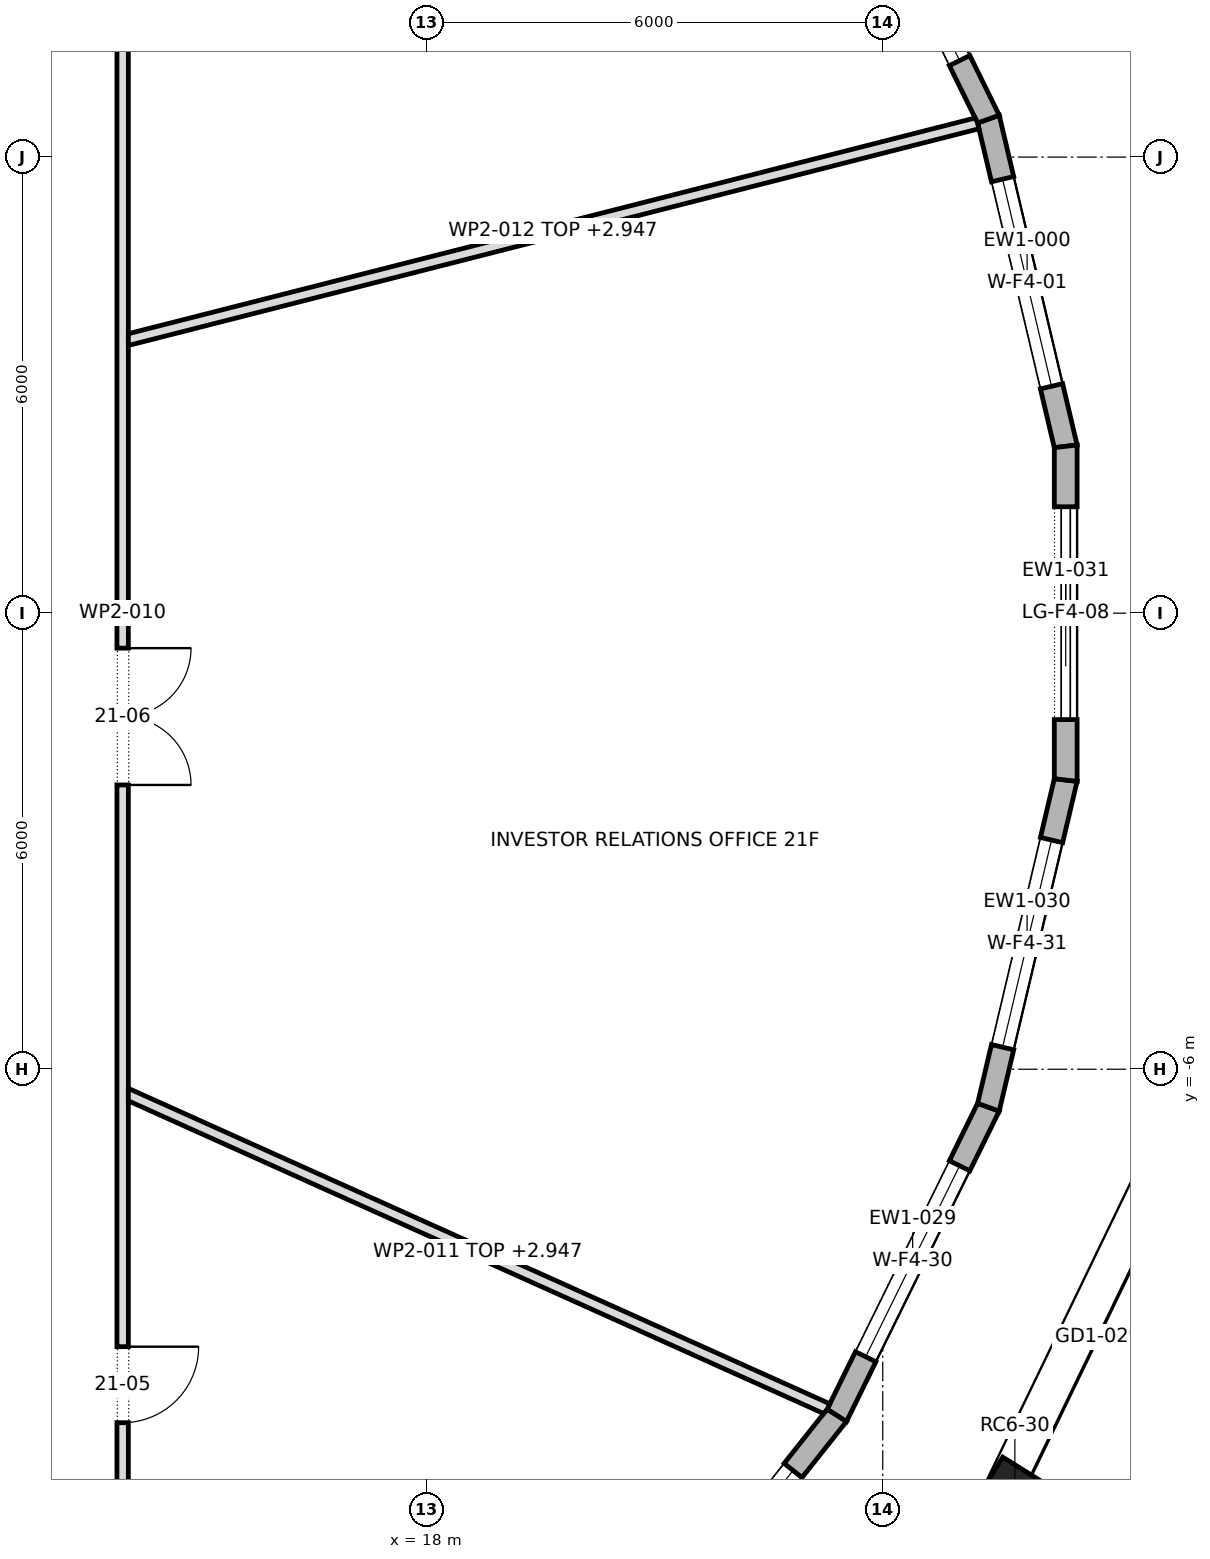
"""IFC4 building model, lengths in metres.
Left out: names, types, materials, properties, quantities, classifications, styles, units other than length and angle.
Written with IfcOpenShell. Run it as: python <this file> out.ifc"""

import sys

from ifc_helpers import new_model, si_unit, direction, frame, frame_2d, origin, origin_2d, place, context, subcontext, project, spatial, polyline, rectangle, outline, extrude, element, fill, save


model = new_model("IFC4")
c1 = context("Model", 3, precision=1e-05, world=origin(), true_north=direction((0.0, 1.0)))
c2 = subcontext(c1, "Body", "Model", "MODEL_VIEW")
j1 = project(units=[si_unit("LENGTHUNIT", "METRE"), si_unit("PLANEANGLEUNIT", "RADIAN")], contexts=[c1])
p1 = place(None, origin())
s1 = spatial("IfcSite", under=j1, at=p1, CompositionType="ELEMENT")
p2 = place(p1, origin())
s2 = spatial("IfcBuilding", under=s1, at=p2, CompositionType="ELEMENT")
p3 = place(p2, frame((0.0, 0.0, 292.3)))
s3 = spatial("IfcBuildingStorey", under=s2, at=p3, CompositionType="ELEMENT", Elevation=292.3)
p4 = place(p3, frame((25.738, -11.792, 0.0), z_axis=(0.0, 0.0, 1.0), x_axis=(0.529141977228, 0.848533303964, 0.0)))
e1 = element("IfcColumn", 1, at=p4, inside=s3, PredefinedType="COLUMN", context=c2, shape_type="SweptSolid", body=[
    extrude(rectangle(XDim=1.0, YDim=1.0, at=origin_2d()), origin(), (0.0, 0.0, 1.0), 4.0),
])
p5 = place(p3, frame((26.407, 2.195, 0.0), z_axis=(0.0, 0.0, 1.0), x_axis=(-0.229943714271, 0.973203929435, 0.0)))
e2 = element("IfcWall", 2, at=p5, inside=s3, PredefinedType="STANDARD", context=c2, shape_type="SweptSolid", body=[
    extrude(outline(polyline([(-0.018, -0.15), (4.44, -0.15), (4.406, 0.15), (0.018, 0.15), (-0.018, -0.15)])), origin(), (0.0, 0.0, 1.0), 3.7),
])
p6 = place(p5, frame((0.812, 0.0, 0.6)))
e3 = element("IfcOpeningElement", 3, at=p6, cuts=e2, PredefinedType="OPENING", context=c2, shape_type="SweptSolid", body=[
    extrude(rectangle(XDim=2.8, YDim=2.65, at=frame_2d((1.4, 1.325))), frame((0.0, 0.162, 0.0), z_axis=(0.0, -1.0, 0.0), x_axis=(1.0, 0.0, 0.0)), (0.0, 0.0, 1.0), 0.324),
])
p7 = place(p3, frame((25.39, 6.5, 0.0), z_axis=(0.0, 0.0, 1.0), x_axis=(-0.441431671743, 0.897294867467, 0.0)))
e4 = element("IfcWall", 4, at=p7, inside=s3, PredefinedType="STANDARD", context=c2, shape_type="SweptSolid", body=[
    extrude(outline(polyline([(-0.017, -0.15), (4.533, -0.15), (4.501, 0.15), (0.017, 0.15), (-0.017, -0.15)])), origin(), (0.0, 0.0, 1.0), 3.7),
])
p8 = place(p7, frame((0.858, 0.0, 0.6)))
e5 = element("IfcOpeningElement", 5, at=p8, cuts=e4, PredefinedType="OPENING", context=c2, shape_type="SweptSolid", body=[
    extrude(rectangle(XDim=2.8, YDim=2.65, at=frame_2d((1.4, 1.325))), frame((0.0, 0.162, 0.0), z_axis=(0.0, -1.0, 0.0), x_axis=(1.0, 0.0, 0.0)), (0.0, 0.0, 1.0), 0.324),
])
p9 = place(p3, frame((20.503, -14.198, 0.0), z_axis=(0.0, 0.0, 1.0), x_axis=(0.621625671247, 0.783314448256, 0.0)))
e6 = element("IfcWall", 6, at=p9, inside=s3, PredefinedType="STANDARD", context=c2, shape_type="SweptSolid", body=[
    extrude(outline(polyline([(-0.015, -0.15), (4.67, -0.15), (4.637, 0.15), (0.015, 0.15), (-0.015, -0.15)])), origin(), (0.0, 0.0, 1.0), 3.7),
])
p10 = place(p9, frame((0.927, 0.0, 0.6)))
e7 = element("IfcOpeningElement", 7, at=p10, cuts=e6, PredefinedType="OPENING", context=c2, shape_type="SweptSolid", body=[
    extrude(rectangle(XDim=2.8, YDim=2.65, at=frame_2d((1.4, 1.325))), frame((0.0, 0.162, 0.0), z_axis=(0.0, -1.0, 0.0), x_axis=(1.0, 0.0, 0.0)), (0.0, 0.0, 1.0), 0.324),
])
p11 = place(p3, frame((23.396, -10.553, 0.0), z_axis=(0.0, 0.0, 1.0), x_axis=(0.441431671743, 0.897294867467, 0.0)))
e8 = element("IfcWall", 8, at=p11, inside=s3, PredefinedType="STANDARD", context=c2, shape_type="SweptSolid", body=[
    extrude(outline(polyline([(-0.016, -0.15), (4.534, -0.15), (4.5, 0.15), (0.016, 0.15), (-0.016, -0.15)])), origin(), (0.0, 0.0, 1.0), 3.7),
])
p12 = place(p11, frame((0.858, 0.0, 0.6)))
e9 = element("IfcOpeningElement", 9, at=p12, cuts=e8, PredefinedType="OPENING", context=c2, shape_type="SweptSolid", body=[
    extrude(rectangle(XDim=2.8, YDim=2.65, at=frame_2d((1.4, 1.325))), frame((0.0, 0.162, 0.0), z_axis=(0.0, -1.0, 0.0), x_axis=(1.0, 0.0, 0.0)), (0.0, 0.0, 1.0), 0.324),
])
p13 = place(p3, frame((25.39, -6.5, 0.0), z_axis=(0.0, 0.0, 1.0), x_axis=(0.229943714271, 0.973203929435, 0.0)))
e10 = element("IfcWall", 10, at=p13, inside=s3, PredefinedType="STANDARD", context=c2, shape_type="SweptSolid", body=[
    extrude(outline(polyline([(-0.017, -0.15), (4.441, -0.15), (4.406, 0.15), (0.017, 0.15), (-0.017, -0.15)])), origin(), (0.0, 0.0, 1.0), 3.7),
])
p14 = place(p13, frame((0.812, 0.0, 0.6)))
e11 = element("IfcOpeningElement", 11, at=p14, cuts=e10, PredefinedType="OPENING", context=c2, shape_type="SweptSolid", body=[
    extrude(rectangle(XDim=2.8, YDim=2.65, at=frame_2d((1.4, 1.325))), frame((0.0, 0.162, 0.0), z_axis=(0.0, -1.0, 0.0), x_axis=(1.0, 0.0, 0.0)), (0.0, 0.0, 1.0), 0.324),
])
p15 = place(p3, frame((26.407, -2.195, 0.0), z_axis=(0.0, 0.0, 1.0), x_axis=(0.0, 1.0, 0.0)))
e12 = element("IfcWall", 12, at=p15, inside=s3, PredefinedType="STANDARD", context=c2, shape_type="SweptSolid", body=[
    extrude(outline(polyline([(-0.018, -0.15), (4.408, -0.15), (4.373, 0.15), (0.018, 0.15), (-0.018, -0.15)])), origin(), (0.0, 0.0, 1.0), 3.7),
])
p16 = place(p15, frame((0.795, 0.0, 0.0)))
e13 = element("IfcOpeningElement", 13, at=p16, cuts=e12, PredefinedType="OPENING", context=c2, shape_type="SweptSolid", body=[
    extrude(rectangle(XDim=2.8, YDim=3.25, at=frame_2d((1.4, 1.625))), frame((0.0, 0.162, 0.0), z_axis=(0.0, -1.0, 0.0), x_axis=(1.0, 0.0, 0.0)), (0.0, 0.0, 1.0), 0.324),
])
p17 = place(p3, frame((14.0, -14.075, 0.0), z_axis=(0.0, 0.0, 1.0), x_axis=(0.0, 1.0, 0.0)))
e14 = element("IfcWall", 14, at=p17, inside=s3, PredefinedType="PARTITIONING", context=c2, shape_type="SweptSolid", body=[
    extrude(outline(polyline([(0.0, -0.075), (1.877, -0.075), (3.753, -0.075), (5.63, -0.075), (7.507, -0.075), (9.383, -0.075), (11.26, -0.075), (13.137, -0.075), (15.013, -0.075), (16.89, -0.075), (18.767, -0.075), (20.643, -0.075), (22.52, -0.075), (24.396, -0.075), (26.273, -0.075), (28.15, -0.075), (28.0, 0.075), (26.011, 0.075), (24.021, 0.075), (22.032, 0.075), (20.043, 0.075), (18.053, 0.075), (16.064, 0.075), (14.075, 0.075), (12.086, 0.075), (10.096, 0.075), (8.107, 0.075), (6.118, 0.075), (4.128, 0.075), (2.139, 0.075), (0.15, 0.075), (0.0, -0.075)])), origin(), (0.0, 0.0, 1.0), 3.7),
])
p18 = place(p17, frame((3.425, 0.0, 0.0)))
e15 = element("IfcOpeningElement", 15, at=p18, cuts=e14, PredefinedType="OPENING", context=c2, shape_type="SweptSolid", body=[
    extrude(rectangle(XDim=1.0, YDim=2.1, at=frame_2d((0.5, 1.05))), frame((0.0, 0.087, 0.0), z_axis=(0.0, -1.0, 0.0), x_axis=(1.0, 0.0, 0.0)), (0.0, 0.0, 1.0), 0.174),
])
p19 = place(p17, frame((11.815, 0.0, 0.0)))
e16 = element("IfcOpeningElement", 16, at=p19, cuts=e14, PredefinedType="OPENING", context=c2, shape_type="SweptSolid", body=[
    extrude(rectangle(XDim=1.8, YDim=2.1, at=frame_2d((0.9, 1.05))), frame((0.0, 0.087, 0.0), z_axis=(0.0, -1.0, 0.0), x_axis=(1.0, 0.0, 0.0)), (0.0, 0.0, 1.0), 0.174),
])
p20 = place(p17, frame((21.965, 0.0, 0.0)))
e17 = element("IfcOpeningElement", 17, at=p20, cuts=e14, PredefinedType="OPENING", context=c2, shape_type="SweptSolid", body=[
    extrude(rectangle(XDim=1.8, YDim=2.1, at=frame_2d((0.9, 1.05))), frame((0.0, 0.087, 0.0), z_axis=(0.0, -1.0, 0.0), x_axis=(1.0, 0.0, 0.0)), (0.0, 0.0, 1.0), 0.174),
])
p21 = place(p3, frame((14.045, -6.32, 0.0), z_axis=(0.0, 0.0, 1.0), x_axis=(0.912030730905, -0.410121867114, 0.0)))
e18 = element("IfcWall", 18, at=p21, inside=s3, PredefinedType="PARTITIONING", context=c2, shape_type="SweptSolid", body=[
    extrude(outline(polyline([(0.067, -0.075), (1.739, -0.075), (3.41, -0.075), (5.082, -0.075), (6.754, -0.075), (8.426, -0.075), (10.097, -0.075), (10.115, -0.004), (10.118, 0.073), (10.118, 0.075), (8.432, 0.075), (6.745, 0.075), (5.059, 0.075), (3.373, 0.075), (1.686, 0.075), (0.0, 0.075), (0.0, 0.074), (0.067, -0.075)])), origin(), (0.0, 0.0, 1.0), 2.947),
])
p22 = place(p3, frame((14.057, 3.594, 0.0), z_axis=(0.0, 0.0, 1.0), x_axis=(0.969049648941, 0.246865910742, 0.0)))
e19 = element("IfcWall", 19, at=p22, inside=s3, PredefinedType="PARTITIONING", context=c2, shape_type="SweptSolid", body=[
    extrude(outline(polyline([(11.548, -0.075), (11.548, 0.011), (11.535, 0.075), (9.618, 0.075), (7.702, 0.075), (5.786, 0.075), (3.87, 0.075), (1.954, 0.075), (0.038, 0.075), (0.0, -0.074), (0.0, -0.075), (1.925, -0.075), (3.849, -0.075), (5.774, -0.075), (7.699, -0.075), (9.624, -0.075), (11.548, -0.075)])), origin(), (0.0, 0.0, 1.0), 2.947),
])
p23 = place(p6, origin())
e20 = element("IfcWindow", 20, at=p23, inside=s3, PartitioningType="DOUBLE_PANEL_VERTICAL", PredefinedType="WINDOW", context=c2, shape_type="SweptSolid", body=[
    extrude(rectangle(XDim=2.8, YDim=2.65, at=frame_2d((1.4, 1.325))), frame((0.0, 0.03, 0.0), z_axis=(0.0, -1.0, 0.0), x_axis=(1.0, 0.0, 0.0)), (0.0, 0.0, 1.0), 0.06),
])
fill(e3, e20)
p24 = place(p8, origin())
e21 = element("IfcWindow", 21, at=p24, inside=s3, PartitioningType="DOUBLE_PANEL_VERTICAL", PredefinedType="WINDOW", context=c2, shape_type="SweptSolid", body=[
    extrude(rectangle(XDim=2.8, YDim=2.65, at=frame_2d((1.4, 1.325))), frame((0.0, 0.03, 0.0), z_axis=(0.0, -1.0, 0.0), x_axis=(1.0, 0.0, 0.0)), (0.0, 0.0, 1.0), 0.06),
])
fill(e5, e21)
p25 = place(p10, origin())
e22 = element("IfcWindow", 22, at=p25, inside=s3, PartitioningType="DOUBLE_PANEL_VERTICAL", PredefinedType="WINDOW", context=c2, shape_type="SweptSolid", body=[
    extrude(rectangle(XDim=2.8, YDim=2.65, at=frame_2d((1.4, 1.325))), frame((0.0, 0.03, 0.0), z_axis=(0.0, -1.0, 0.0), x_axis=(1.0, 0.0, 0.0)), (0.0, 0.0, 1.0), 0.06),
])
fill(e7, e22)
p26 = place(p12, origin())
e23 = element("IfcWindow", 23, at=p26, inside=s3, PartitioningType="DOUBLE_PANEL_VERTICAL", PredefinedType="WINDOW", context=c2, shape_type="SweptSolid", body=[
    extrude(rectangle(XDim=2.8, YDim=2.65, at=frame_2d((1.4, 1.325))), frame((0.0, 0.03, 0.0), z_axis=(0.0, -1.0, 0.0), x_axis=(1.0, 0.0, 0.0)), (0.0, 0.0, 1.0), 0.06),
])
fill(e9, e23)
p27 = place(p14, origin())
e24 = element("IfcWindow", 24, at=p27, inside=s3, PartitioningType="DOUBLE_PANEL_VERTICAL", PredefinedType="WINDOW", context=c2, shape_type="SweptSolid", body=[
    extrude(rectangle(XDim=2.8, YDim=2.65, at=frame_2d((1.4, 1.325))), frame((0.0, 0.03, 0.0), z_axis=(0.0, -1.0, 0.0), x_axis=(1.0, 0.0, 0.0)), (0.0, 0.0, 1.0), 0.06),
])
fill(e11, e24)
p28 = place(p16, origin())
e25 = element("IfcDoor", 25, at=p28, inside=s3, OperationType="DOUBLE_DOOR_SLIDING", PredefinedType="DOOR", context=c2, shape_type="SweptSolid", body=[
    extrude(rectangle(XDim=2.8, YDim=3.25, at=frame_2d((1.4, 1.625))), frame((0.0, 0.025, 0.0), z_axis=(0.0, -1.0, 0.0), x_axis=(1.0, 0.0, 0.0)), (0.0, 0.0, 1.0), 0.05),
])
fill(e13, e25)
p29 = place(p18, frame((1.0, 0.0, 0.0), z_axis=(0.0, 0.0, 1.0), x_axis=(-1.0, 0.0, 0.0)))
e26 = element("IfcDoor", 26, at=p29, inside=s3, OperationType="SINGLE_SWING_RIGHT", PredefinedType="DOOR", context=c2, shape_type="SweptSolid", body=[
    extrude(rectangle(XDim=1.0, YDim=2.1, at=frame_2d((0.5, 1.05))), frame((0.0, 0.025, 0.0), z_axis=(0.0, -1.0, 0.0), x_axis=(1.0, 0.0, 0.0)), (0.0, 0.0, 1.0), 0.05),
])
fill(e15, e26)
p30 = place(p19, frame((1.8, 0.0, 0.0), z_axis=(0.0, 0.0, 1.0), x_axis=(-1.0, 0.0, 0.0)))
e27 = element("IfcDoor", 27, at=p30, inside=s3, OperationType="DOUBLE_DOOR_SINGLE_SWING", PredefinedType="DOOR", context=c2, shape_type="SweptSolid", body=[
    extrude(rectangle(XDim=1.8, YDim=2.1, at=frame_2d((0.9, 1.05))), frame((0.0, 0.025, 0.0), z_axis=(0.0, -1.0, 0.0), x_axis=(1.0, 0.0, 0.0)), (0.0, 0.0, 1.0), 0.05),
])
fill(e16, e27)
save(model, sys.argv[1])
